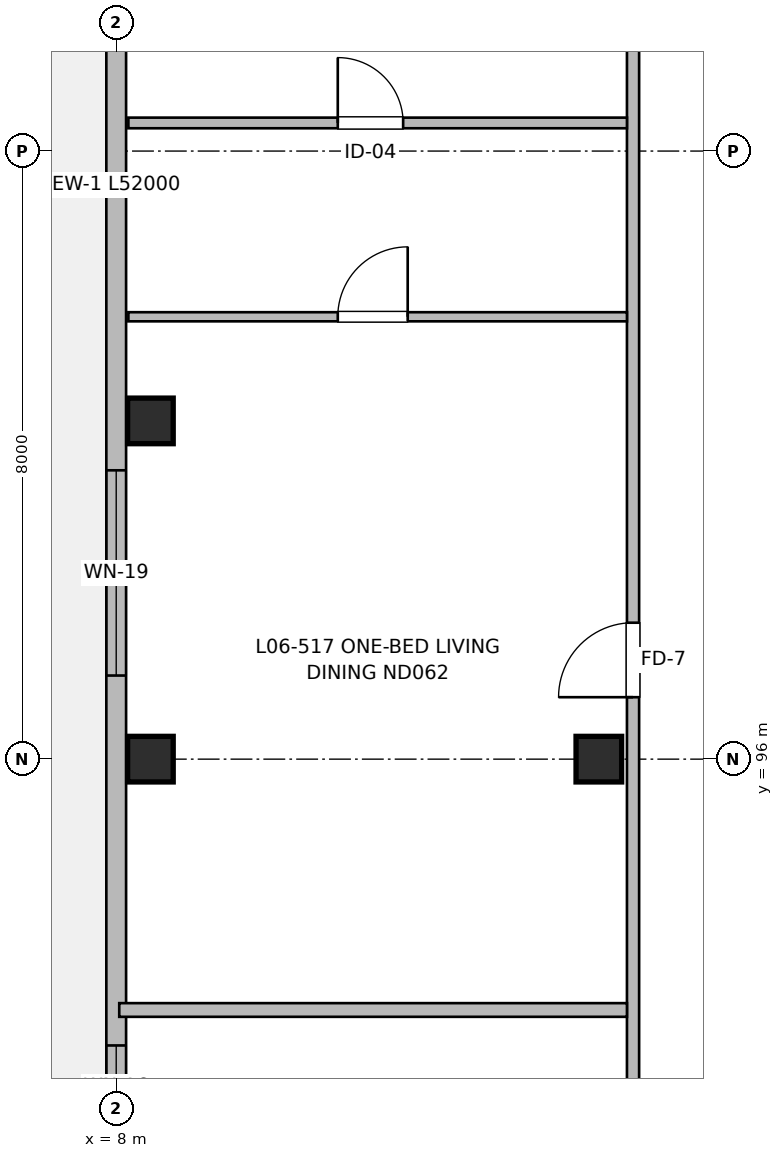
"""IFC4 building model, lengths in metres.
Left out: names, types, materials, properties, quantities, classifications, styles, units other than length and angle.
Written with IfcOpenShell. Run it as: python <this file> out.ifc"""

import sys

from ifc_helpers import new_model, si_unit, direction, frame, frame_2d, origin, origin_2d, place, context, subcontext, project, spatial, rectangle, extrude, element, fill, save


model = new_model("IFC4")
c1 = context("Model", 3, precision=1e-05, world=origin(), true_north=direction((0.0, 1.0)))
c2 = subcontext(c1, "Body", "Model", "MODEL_VIEW")
j1 = project(units=[si_unit("LENGTHUNIT", "METRE"), si_unit("PLANEANGLEUNIT", "RADIAN")], contexts=[c1])
p1 = place(None, origin())
s1 = spatial("IfcSite", under=j1, at=p1, CompositionType="ELEMENT")
p2 = place(p1, origin())
s2 = spatial("IfcBuilding", under=s1, at=p2, CompositionType="ELEMENT")
p3 = place(p2, frame((0.0, 0.0, 20.16)))
s3 = spatial("IfcBuildingStorey", under=s2, at=p3, CompositionType="ELEMENT", Elevation=20.16)
for number, where, z_axis, x_axis in (
    (1, (8.45, 96.0, 0.0), (0.0, 0.0, 1.0), (1.0, 0.0, 0.0)),
    (2, (8.45, 100.45, 0.0), (0.0, 0.0, 1.0), (1.0, 0.0, 0.0)),
    (3, (14.35, 96.0, 0.0), (0.0, 0.0, 1.0), (1.0, 0.0, 0.0)),
):
    element("IfcColumn", number, at=place(p3, frame(where, z_axis=z_axis, x_axis=x_axis)), inside=s3, PredefinedType="COLUMN", context=c2, shape_type="SweptSolid", body=[
        extrude(rectangle(XDim=0.6, YDim=0.6, at=origin_2d()), origin(), (0.0, 0.0, 1.0), 3.2),
    ])
p4 = place(p3, frame((8.0, 61.8, 0.0), z_axis=(0.0, 0.0, 1.0), x_axis=(0.0, 1.0, 0.0)))
e4 = element("IfcWall", 4, at=p4, inside=s3, PredefinedType="SOLIDWALL", context=c2, shape_type="SweptSolid", body=[
    extrude(rectangle(XDim=52.0, YDim=0.26, at=frame_2d((26.0, 0.0))), origin(), (0.0, 0.0, 1.0), 2.98),
])
p5 = place(p4, frame((3.283, 0.0, 0.0)))
e5 = element("IfcOpeningElement", 5, at=p5, cuts=e4, PredefinedType="OPENING", context=c2, shape_type="SweptSolid", body=[
    extrude(rectangle(XDim=1.2, YDim=2.2, at=frame_2d((0.6, 1.1))), frame((0.0, 0.14, 0.0), z_axis=(0.0, -1.0, 0.0), x_axis=(1.0, 0.0, 0.0)), (0.0, 0.0, 1.0), 0.28),
])
p6 = place(p4, frame((6.083, 0.0, 0.57)))
e6 = element("IfcOpeningElement", 6, at=p6, cuts=e4, PredefinedType="OPENING", context=c2, shape_type="SweptSolid", body=[
    extrude(rectangle(XDim=2.3, YDim=1.65, at=frame_2d((1.15, 0.825))), frame((0.0, 0.14, 0.0), z_axis=(0.0, -1.0, 0.0), x_axis=(1.0, 0.0, 0.0)), (0.0, 0.0, 1.0), 0.28),
])
p7 = place(p4, frame((12.85, 0.0, 0.9)))
e7 = element("IfcOpeningElement", 7, at=p7, cuts=e4, PredefinedType="OPENING", context=c2, shape_type="SweptSolid", body=[
    extrude(rectangle(XDim=1.2, YDim=1.05, at=frame_2d((0.6, 0.525))), frame((0.0, 0.14, 0.0), z_axis=(0.0, -1.0, 0.0), x_axis=(1.0, 0.0, 0.0)), (0.0, 0.0, 1.0), 0.28),
])
p8 = place(p4, frame((21.342, 0.0, 0.9)))
e8 = element("IfcOpeningElement", 8, at=p8, cuts=e4, PredefinedType="OPENING", context=c2, shape_type="SweptSolid", body=[
    extrude(rectangle(XDim=0.65, YDim=0.95, at=frame_2d((0.325, 0.475))), frame((0.0, 0.14, 0.0), z_axis=(0.0, -1.0, 0.0), x_axis=(1.0, 0.0, 0.0)), (0.0, 0.0, 1.0), 0.28),
])
p9 = place(p4, frame((29.333, 0.0, 0.62)))
e9 = element("IfcOpeningElement", 9, at=p9, cuts=e4, PredefinedType="OPENING", context=c2, shape_type="SweptSolid", body=[
    extrude(rectangle(XDim=1.1, YDim=1.6, at=frame_2d((0.55, 0.8))), frame((0.0, 0.14, 0.0), z_axis=(0.0, -1.0, 0.0), x_axis=(1.0, 0.0, 0.0)), (0.0, 0.0, 1.0), 0.28),
])
p10 = place(p4, frame((35.3, 0.0, 0.47)))
e10 = element("IfcOpeningElement", 10, at=p10, cuts=e4, PredefinedType="OPENING", context=c2, shape_type="SweptSolid", body=[
    extrude(rectangle(XDim=2.7, YDim=1.75, at=frame_2d((1.35, 0.875))), frame((0.0, 0.14, 0.0), z_axis=(0.0, -1.0, 0.0), x_axis=(1.0, 0.0, 0.0)), (0.0, 0.0, 1.0), 0.28),
])
p11 = place(p4, frame((45.517, 0.0, 0.72)))
e11 = element("IfcOpeningElement", 11, at=p11, cuts=e4, PredefinedType="OPENING", context=c2, shape_type="SweptSolid", body=[
    extrude(rectangle(XDim=1.7, YDim=1.5, at=frame_2d((0.85, 0.75))), frame((0.0, 0.14, 0.0), z_axis=(0.0, -1.0, 0.0), x_axis=(1.0, 0.0, 0.0)), (0.0, 0.0, 1.0), 0.28),
])
p12 = place(p3, frame((14.8, 61.96, 0.0), z_axis=(0.0, 0.0, 1.0), x_axis=(0.0, 1.0, 0.0)))
e12 = element("IfcWall", 12, at=p12, inside=s3, PredefinedType="PARTITIONING", context=c2, shape_type="SweptSolid", body=[
    extrude(rectangle(XDim=44.84, YDim=0.16, at=frame_2d((22.42, 0.0))), origin(), (0.0, 0.0, 1.0), 2.935),
])
p13 = place(p12, frame((7.04, 0.0, 0.0)))
e13 = element("IfcOpeningElement", 13, at=p13, cuts=e12, PredefinedType="OPENING", context=c2, shape_type="SweptSolid", body=[
    extrude(rectangle(XDim=1.1, YDim=2.15, at=frame_2d((0.55, 1.075))), frame((0.0, 0.09, 0.0), z_axis=(0.0, -1.0, 0.0), x_axis=(1.0, 0.0, 0.0)), (0.0, 0.0, 1.0), 0.18),
])
p14 = place(p12, frame((13.44, 0.0, 0.0)))
e14 = element("IfcOpeningElement", 14, at=p14, cuts=e12, PredefinedType="OPENING", context=c2, shape_type="SweptSolid", body=[
    extrude(rectangle(XDim=1.6, YDim=2.15, at=frame_2d((0.8, 1.075))), frame((0.0, 0.09, 0.0), z_axis=(0.0, -1.0, 0.0), x_axis=(1.0, 0.0, 0.0)), (0.0, 0.0, 1.0), 0.18),
])
p15 = place(p12, frame((3.0, 0.0, 0.0)))
e15 = element("IfcOpeningElement", 15, at=p15, cuts=e12, PredefinedType="OPENING", context=c2, shape_type="SweptSolid", body=[
    extrude(rectangle(XDim=0.96, YDim=2.15, at=frame_2d((0.48, 1.075))), frame((0.0, 0.09, 0.0), z_axis=(0.0, -1.0, 0.0), x_axis=(1.0, 0.0, 0.0)), (0.0, 0.0, 1.0), 0.18),
])
p16 = place(p12, frame((27.045, 0.0, 0.0)))
e16 = element("IfcOpeningElement", 16, at=p16, cuts=e12, PredefinedType="OPENING", context=c2, shape_type="SweptSolid", body=[
    extrude(rectangle(XDim=0.98, YDim=2.15, at=frame_2d((0.49, 1.075))), frame((0.0, 0.09, 0.0), z_axis=(0.0, -1.0, 0.0), x_axis=(1.0, 0.0, 0.0)), (0.0, 0.0, 1.0), 0.18),
])
p17 = place(p12, frame((34.855, 0.0, 0.0)))
e17 = element("IfcOpeningElement", 17, at=p17, cuts=e12, PredefinedType="OPENING", context=c2, shape_type="SweptSolid", body=[
    extrude(rectangle(XDim=0.98, YDim=2.15, at=frame_2d((0.49, 1.075))), frame((0.0, 0.09, 0.0), z_axis=(0.0, -1.0, 0.0), x_axis=(1.0, 0.0, 0.0)), (0.0, 0.0, 1.0), 0.18),
])
p18 = place(p3, frame((8.04, 92.7, 0.0), z_axis=(0.0, 0.0, 1.0), x_axis=(1.0, 0.0, 0.0)))
e18 = element("IfcWall", 18, at=p18, inside=s3, PredefinedType="PARTITIONING", context=c2, shape_type="SweptSolid", body=[
    extrude(rectangle(XDim=6.68, YDim=0.18, at=frame_2d((3.34, 0.0))), origin(), (0.0, 0.0, 1.0), 2.935),
])
p19 = place(p3, frame((8.16, 101.82, 0.0), z_axis=(0.0, 0.0, 1.0), x_axis=(1.0, 0.0, 0.0)))
e19 = element("IfcWall", 19, at=p19, inside=s3, PredefinedType="PARTITIONING", context=c2, shape_type="SweptSolid", body=[
    extrude(rectangle(XDim=6.56, YDim=0.12, at=frame_2d((3.28, 0.0))), origin(), (0.0, 0.0, 1.0), 2.935),
])
p20 = place(p19, frame((2.755, 0.0, 0.0)))
e20 = element("IfcOpeningElement", 20, at=p20, cuts=e19, PredefinedType="OPENING", context=c2, shape_type="SweptSolid", body=[
    extrude(rectangle(XDim=0.92, YDim=2.1, at=frame_2d((0.46, 1.05))), frame((0.0, 0.07, 0.0), z_axis=(0.0, -1.0, 0.0), x_axis=(1.0, 0.0, 0.0)), (0.0, 0.0, 1.0), 0.14),
])
p21 = place(p3, frame((8.16, 104.37, 0.0), z_axis=(0.0, 0.0, 1.0), x_axis=(1.0, 0.0, 0.0)))
e21 = element("IfcWall", 21, at=p21, inside=s3, PredefinedType="PARTITIONING", context=c2, shape_type="SweptSolid", body=[
    extrude(rectangle(XDim=6.56, YDim=0.14, at=frame_2d((3.28, 0.0))), origin(), (0.0, 0.0, 1.0), 2.935),
])
p22 = place(p21, frame((2.755, 0.0, 0.0)))
e22 = element("IfcOpeningElement", 22, at=p22, cuts=e21, PredefinedType="OPENING", context=c2, shape_type="SweptSolid", body=[
    extrude(rectangle(XDim=0.86, YDim=2.1, at=frame_2d((0.43, 1.05))), frame((0.0, 0.08, 0.0), z_axis=(0.0, -1.0, 0.0), x_axis=(1.0, 0.0, 0.0)), (0.0, 0.0, 1.0), 0.16),
])
p23 = place(p9, origin())
e23 = element("IfcWindow", 23, at=p23, inside=s3, PartitioningType="SINGLE_PANEL", PredefinedType="WINDOW", context=c2, shape_type="SweptSolid", body=[
    extrude(rectangle(XDim=1.1, YDim=1.6, at=frame_2d((0.55, 0.8))), frame((0.0, 0.03, 0.0), z_axis=(0.0, -1.0, 0.0), x_axis=(1.0, 0.0, 0.0)), (0.0, 0.0, 1.0), 0.06),
])
fill(e9, e23)
p24 = place(p10, origin())
e24 = element("IfcWindow", 24, at=p24, inside=s3, PartitioningType="SINGLE_PANEL", PredefinedType="WINDOW", context=c2, shape_type="SweptSolid", body=[
    extrude(rectangle(XDim=2.7, YDim=1.75, at=frame_2d((1.35, 0.875))), frame((0.0, 0.03, 0.0), z_axis=(0.0, -1.0, 0.0), x_axis=(1.0, 0.0, 0.0)), (0.0, 0.0, 1.0), 0.06),
])
fill(e10, e24)
p25 = place(p22, origin())
e25 = element("IfcDoor", 25, at=p25, inside=s3, OperationType="SINGLE_SWING_LEFT", PredefinedType="DOOR", context=c2, shape_type="SweptSolid", body=[
    extrude(rectangle(XDim=0.86, YDim=2.1, at=frame_2d((0.43, 1.05))), frame((0.0, 0.025, 0.0), z_axis=(0.0, -1.0, 0.0), x_axis=(1.0, 0.0, 0.0)), (0.0, 0.0, 1.0), 0.05),
])
fill(e22, e25)
p26 = place(p20, origin())
e26 = element("IfcDoor", 26, at=p26, inside=s3, OperationType="SINGLE_SWING_RIGHT", PredefinedType="DOOR", context=c2, shape_type="SweptSolid", body=[
    extrude(rectangle(XDim=0.92, YDim=2.1, at=frame_2d((0.46, 1.05))), frame((0.0, 0.025, 0.0), z_axis=(0.0, -1.0, 0.0), x_axis=(1.0, 0.0, 0.0)), (0.0, 0.0, 1.0), 0.05),
])
fill(e20, e26)
p27 = place(p17, origin())
e27 = element("IfcDoor", 27, at=p27, inside=s3, OperationType="SINGLE_SWING_LEFT", PredefinedType="DOOR", context=c2, shape_type="SweptSolid", body=[
    extrude(rectangle(XDim=0.98, YDim=2.15, at=frame_2d((0.49, 1.075))), frame((0.0, 0.025, 0.0), z_axis=(0.0, -1.0, 0.0), x_axis=(1.0, 0.0, 0.0)), (0.0, 0.0, 1.0), 0.05),
])
fill(e17, e27)
save(model, sys.argv[1])
